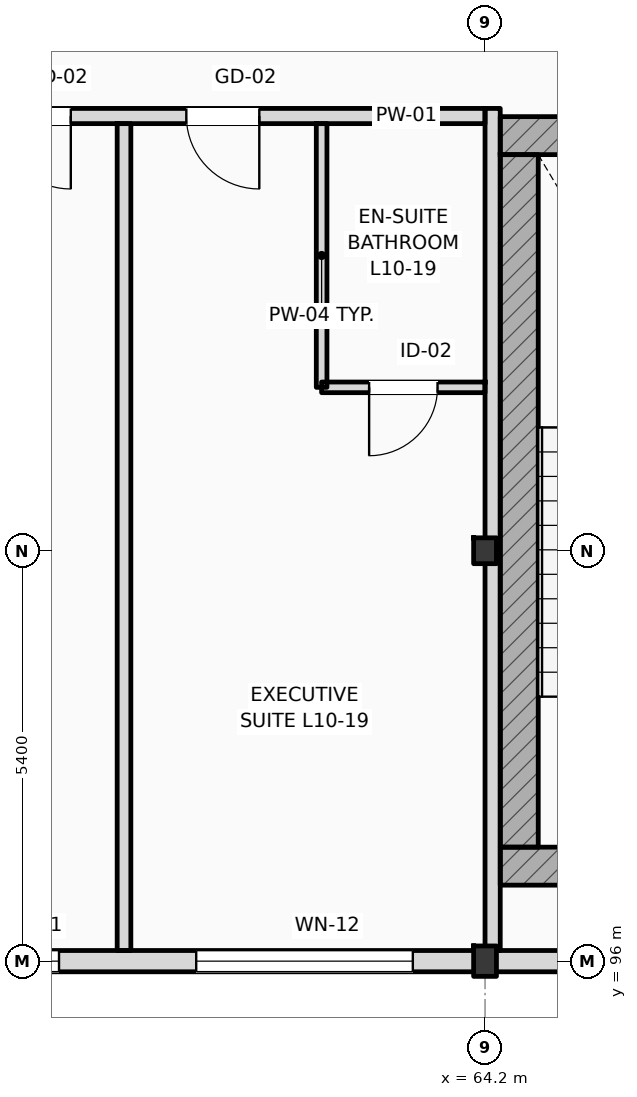
"""IFC4 building model, lengths in metres.
Left out: names, types, materials, properties, quantities, classifications, styles, units other than length and angle.
Written with IfcOpenShell. Run it as: python <this file> out.ifc"""

import sys

from ifc_helpers import new_model, si_unit, direction, frame, frame_2d, origin, origin_2d, place, context, subcontext, project, spatial, rectangle, i_section, extrude, element, fill, save


model = new_model("IFC4")
c1 = context("Model", 3, precision=1e-05, world=origin(), true_north=direction((0.0, 1.0)))
c2 = subcontext(c1, "Body", "Model", "MODEL_VIEW")
j1 = project(units=[si_unit("LENGTHUNIT", "METRE"), si_unit("PLANEANGLEUNIT", "RADIAN")], contexts=[c1])
p1 = place(None, origin())
s1 = spatial("IfcSite", under=j1, at=p1, CompositionType="ELEMENT")
p2 = place(p1, origin())
s2 = spatial("IfcBuilding", under=s1, at=p2, CompositionType="ELEMENT")
p3 = place(p2, frame((0.0, 0.0, 42.6)))
s3 = spatial("IfcBuildingStorey", under=s2, at=p3, CompositionType="ELEMENT", Elevation=42.6)
p4 = place(p3, frame((64.2, 96.0, 0.0), z_axis=(0.0, 0.0, 1.0), x_axis=(1.0, 0.0, 0.0)))
e1 = element("IfcColumn", 1, at=p4, inside=s3, PredefinedType="COLUMN", context=c2, shape_type="SweptSolid", body=[
    extrude(i_section(OverallWidth=0.3, OverallDepth=0.4, WebThickness=0.013, FlangeThickness=0.024, FilletRadius=0.027, at=origin_2d()), origin(), (0.0, 0.0, 1.0), 4.2),
])
p5 = place(p3, frame((64.2, 101.4, 0.0), z_axis=(0.0, 0.0, 1.0), x_axis=(1.0, 0.0, 0.0)))
e2 = element("IfcColumn", 2, at=p5, inside=s3, PredefinedType="COLUMN", context=c2, shape_type="SweptSolid", body=[
    extrude(i_section(OverallWidth=0.3, OverallDepth=0.34, WebThickness=0.012, FlangeThickness=0.021, FilletRadius=0.027, at=origin_2d()), origin(), (0.0, 0.0, 1.0), 4.2),
])
for number, where, z_axis, x_axis in (
    (3, (64.4, 106.862, 0.0), (0.0, 0.0, 1.0), (1.0, 0.0, 0.0)),
    (4, (64.4, 97.25, 0.0), (0.0, 0.0, 1.0), (1.0, 0.0, 0.0)),
):
    element("IfcWall", number, at=place(p3, frame(where, z_axis=z_axis, x_axis=x_axis)), inside=s3, PredefinedType="SHEAR", context=c2, shape_type="SweptSolid", body=[
        extrude(rectangle(XDim=5.16, YDim=0.5, at=frame_2d((2.58, 0.0))), origin(), (0.0, 0.0, 1.0), 4.2),
    ])
p6 = place(p3, frame((64.65, 97.5, 0.0), z_axis=(0.0, 0.0, 1.0), x_axis=(0.0, 1.0, 0.0)))
e5 = element("IfcWall", 5, at=p6, inside=s3, PredefinedType="SHEAR", context=c2, shape_type="SweptSolid", body=[
    extrude(rectangle(XDim=9.112, YDim=0.5, at=frame_2d((4.556, 0.0))), origin(), (0.0, 0.0, 1.0), 4.2),
])
p7 = place(p3, frame((25.2, 96.0, 0.0), z_axis=(0.0, 0.0, 1.0), x_axis=(1.0, 0.0, 0.0)))
e6 = element("IfcWall", 6, at=p7, inside=s3, PredefinedType="STANDARD", context=c2, shape_type="SweptSolid", body=[
    extrude(rectangle(XDim=70.2, YDim=0.28, at=frame_2d((35.1, 0.0))), origin(), (0.0, 0.0, 1.0), 3.42),
])
p8 = place(p7, frame((16.83, 0.0, 0.9)))
e7 = element("IfcOpeningElement", 7, at=p8, cuts=e6, PredefinedType="OPENING", context=c2, shape_type="SweptSolid", body=[
    extrude(rectangle(XDim=2.25, YDim=2.15, at=frame_2d((1.125, 1.075))), frame((0.0, 0.15, 0.0), z_axis=(0.0, -1.0, 0.0), x_axis=(1.0, 0.0, 0.0)), (0.0, 0.0, 1.0), 0.3),
])
p9 = place(p7, frame((20.815, 0.0, 0.9)))
e8 = element("IfcOpeningElement", 8, at=p9, cuts=e6, PredefinedType="OPENING", context=c2, shape_type="SweptSolid", body=[
    extrude(rectangle(XDim=1.8, YDim=2.2, at=frame_2d((0.9, 1.1))), frame((0.0, 0.15, 0.0), z_axis=(0.0, -1.0, 0.0), x_axis=(1.0, 0.0, 0.0)), (0.0, 0.0, 1.0), 0.3),
])
p10 = place(p7, frame((26.03, 0.0, 0.9)))
e9 = element("IfcOpeningElement", 9, at=p10, cuts=e6, PredefinedType="OPENING", context=c2, shape_type="SweptSolid", body=[
    extrude(rectangle(XDim=2.55, YDim=2.25, at=frame_2d((1.275, 1.125))), frame((0.0, 0.15, 0.0), z_axis=(0.0, -1.0, 0.0), x_axis=(1.0, 0.0, 0.0)), (0.0, 0.0, 1.0), 0.3),
])
p11 = place(p7, frame((32.045, 0.0, 0.9)))
e10 = element("IfcOpeningElement", 10, at=p11, cuts=e6, PredefinedType="OPENING", context=c2, shape_type="SweptSolid", body=[
    extrude(rectangle(XDim=1.35, YDim=2.3, at=frame_2d((0.675, 1.15))), frame((0.0, 0.15, 0.0), z_axis=(0.0, -1.0, 0.0), x_axis=(1.0, 0.0, 0.0)), (0.0, 0.0, 1.0), 0.3),
])
p12 = place(p7, frame((35.2, 0.0, 0.9)))
e11 = element("IfcOpeningElement", 11, at=p12, cuts=e6, PredefinedType="OPENING", context=c2, shape_type="SweptSolid", body=[
    extrude(rectangle(XDim=2.85, YDim=2.34, at=frame_2d((1.425, 1.17))), frame((0.0, 0.15, 0.0), z_axis=(0.0, -1.0, 0.0), x_axis=(1.0, 0.0, 0.0)), (0.0, 0.0, 1.0), 0.3),
])
p13 = place(p7, frame((55.544, 0.0, 0.9)))
e12 = element("IfcOpeningElement", 12, at=p13, cuts=e6, PredefinedType="OPENING", context=c2, shape_type="SweptSolid", body=[
    extrude(rectangle(XDim=3.0, YDim=2.34, at=frame_2d((1.5, 1.17))), frame((0.0, 0.15, 0.0), z_axis=(0.0, -1.0, 0.0), x_axis=(1.0, 0.0, 0.0)), (0.0, 0.0, 1.0), 0.3),
])
p14 = place(p7, frame((60.151, 0.0, 0.9)))
e13 = element("IfcOpeningElement", 13, at=p14, cuts=e6, PredefinedType="OPENING", context=c2, shape_type="SweptSolid", body=[
    extrude(rectangle(XDim=1.35, YDim=2.34, at=frame_2d((0.675, 1.17))), frame((0.0, 0.15, 0.0), z_axis=(0.0, -1.0, 0.0), x_axis=(1.0, 0.0, 0.0)), (0.0, 0.0, 1.0), 0.3),
])
p15 = place(p7, frame((65.582, 0.0, 0.9)))
e14 = element("IfcOpeningElement", 14, at=p15, cuts=e6, PredefinedType="OPENING", context=c2, shape_type="SweptSolid", body=[
    extrude(rectangle(XDim=3.4, YDim=2.34, at=frame_2d((1.7, 1.17))), frame((0.0, 0.15, 0.0), z_axis=(0.0, -1.0, 0.0), x_axis=(1.0, 0.0, 0.0)), (0.0, 0.0, 1.0), 0.3),
])
p16 = place(p3, frame((40.76, 107.12, 0.0), z_axis=(0.0, 0.0, 1.0), x_axis=(1.0, 0.0, 0.0)))
e15 = element("IfcWall", 15, at=p16, inside=s3, PredefinedType="PARTITIONING", context=c2, shape_type="SweptSolid", body=[
    extrude(rectangle(XDim=23.44, YDim=0.2, at=frame_2d((11.72, 0.0))), origin(), (0.0, 0.0, 1.0), 3.94),
])
p17 = place(p16, frame((2.99, 0.0, 0.0)))
e16 = element("IfcOpeningElement", 16, at=p17, cuts=e15, PredefinedType="OPENING", context=c2, shape_type="SweptSolid", body=[
    extrude(rectangle(XDim=0.96, YDim=2.2, at=frame_2d((0.48, 1.1))), frame((0.0, 0.11, 0.0), z_axis=(0.0, -1.0, 0.0), x_axis=(1.0, 0.0, 0.0)), (0.0, 0.0, 1.0), 0.22),
])
p18 = place(p16, frame((5.5, 0.0, 0.0)))
e17 = element("IfcOpeningElement", 17, at=p18, cuts=e15, PredefinedType="OPENING", context=c2, shape_type="SweptSolid", body=[
    extrude(rectangle(XDim=0.96, YDim=2.2, at=frame_2d((0.48, 1.1))), frame((0.0, 0.11, 0.0), z_axis=(0.0, -1.0, 0.0), x_axis=(1.0, 0.0, 0.0)), (0.0, 0.0, 1.0), 0.22),
])
p19 = place(p16, frame((12.34, 0.0, 0.0)))
e18 = element("IfcOpeningElement", 18, at=p19, cuts=e15, PredefinedType="OPENING", context=c2, shape_type="SweptSolid", body=[
    extrude(rectangle(XDim=0.96, YDim=2.2, at=frame_2d((0.48, 1.1))), frame((0.0, 0.11, 0.0), z_axis=(0.0, -1.0, 0.0), x_axis=(1.0, 0.0, 0.0)), (0.0, 0.0, 1.0), 0.22),
])
p20 = place(p16, frame((17.03, 0.0, 0.0)))
e19 = element("IfcOpeningElement", 19, at=p20, cuts=e15, PredefinedType="OPENING", context=c2, shape_type="SweptSolid", body=[
    extrude(rectangle(XDim=0.96, YDim=2.2, at=frame_2d((0.48, 1.1))), frame((0.0, 0.11, 0.0), z_axis=(0.0, -1.0, 0.0), x_axis=(1.0, 0.0, 0.0)), (0.0, 0.0, 1.0), 0.22),
])
p21 = place(p16, frame((19.51, 0.0, 0.0)))
e20 = element("IfcOpeningElement", 20, at=p21, cuts=e15, PredefinedType="OPENING", context=c2, shape_type="SweptSolid", body=[
    extrude(rectangle(XDim=0.96, YDim=2.2, at=frame_2d((0.48, 1.1))), frame((0.0, 0.11, 0.0), z_axis=(0.0, -1.0, 0.0), x_axis=(1.0, 0.0, 0.0)), (0.0, 0.0, 1.0), 0.22),
])
p22 = place(p3, frame((64.3, 96.14, 0.0), z_axis=(0.0, 0.0, 1.0), x_axis=(0.0, 1.0, 0.0)))
e21 = element("IfcWall", 21, at=p22, inside=s3, PredefinedType="PARTITIONING", context=c2, shape_type="SweptSolid", body=[
    extrude(rectangle(XDim=11.08, YDim=0.2, at=frame_2d((5.54, 0.0))), origin(), (0.0, 0.0, 1.0), 3.57),
])
p23 = place(p3, frame((59.45, 96.14, 0.0), z_axis=(0.0, 0.0, 1.0), x_axis=(0.0, 1.0, 0.0)))
e22 = element("IfcWall", 22, at=p23, inside=s3, PredefinedType="PARTITIONING", context=c2, shape_type="SweptSolid", body=[
    extrude(rectangle(XDim=10.88, YDim=0.18, at=frame_2d((5.44, 0.0))), origin(), (0.0, 0.0, 1.0), 3.94),
])
p24 = place(p3, frame((62.05, 103.55, 0.0), z_axis=(0.0, 0.0, 1.0), x_axis=(0.0, 1.0, 0.0)))
e23 = element("IfcWall", 23, at=p24, inside=s3, PredefinedType="PARTITIONING", context=c2, shape_type="SweptSolid", body=[
    extrude(rectangle(XDim=3.47, YDim=0.14, at=frame_2d((1.735, 0.0))), origin(), (0.0, 0.0, 1.0), 3.94),
])
p25 = place(p3, frame((62.05, 103.55, 0.0), z_axis=(0.0, 0.0, 1.0), x_axis=(1.0, 0.0, 0.0)))
e24 = element("IfcWall", 24, at=p25, inside=s3, PredefinedType="PARTITIONING", context=c2, shape_type="SweptSolid", body=[
    extrude(rectangle(XDim=2.15, YDim=0.14, at=frame_2d((1.075, 0.0))), origin(), (0.0, 0.0, 1.0), 3.94),
])
p26 = place(p25, frame((0.625, 0.0, 0.0)))
e25 = element("IfcOpeningElement", 25, at=p26, cuts=e24, PredefinedType="OPENING", context=c2, shape_type="SweptSolid", body=[
    extrude(rectangle(XDim=0.9, YDim=2.1, at=frame_2d((0.45, 1.05))), frame((0.0, 0.08, 0.0), z_axis=(0.0, -1.0, 0.0), x_axis=(1.0, 0.0, 0.0)), (0.0, 0.0, 1.0), 0.16),
])
p27 = place(p11, origin())
e26 = element("IfcWindow", 26, at=p27, inside=s3, PartitioningType="DOUBLE_PANEL_VERTICAL", PredefinedType="WINDOW", context=c2, shape_type="SweptSolid", body=[
    extrude(rectangle(XDim=1.35, YDim=2.3, at=frame_2d((0.675, 1.15))), frame((0.0, 0.03, 0.0), z_axis=(0.0, -1.0, 0.0), x_axis=(1.0, 0.0, 0.0)), (0.0, 0.0, 1.0), 0.06),
])
fill(e10, e26)
p28 = place(p12, origin())
e27 = element("IfcWindow", 27, at=p28, inside=s3, PartitioningType="DOUBLE_PANEL_VERTICAL", PredefinedType="WINDOW", context=c2, shape_type="SweptSolid", body=[
    extrude(rectangle(XDim=2.85, YDim=2.34, at=frame_2d((1.425, 1.17))), frame((0.0, 0.03, 0.0), z_axis=(0.0, -1.0, 0.0), x_axis=(1.0, 0.0, 0.0)), (0.0, 0.0, 1.0), 0.06),
])
fill(e11, e27)
p29 = place(p20, frame((0.96, 0.0, 0.0), z_axis=(0.0, 0.0, 1.0), x_axis=(-1.0, 0.0, 0.0)))
e28 = element("IfcDoor", 28, at=p29, inside=s3, OperationType="SINGLE_SWING_RIGHT", PredefinedType="DOOR", context=c2, shape_type="SweptSolid", body=[
    extrude(rectangle(XDim=0.96, YDim=2.2, at=frame_2d((0.48, 1.1))), frame((0.0, 0.025, 0.0), z_axis=(0.0, -1.0, 0.0), x_axis=(1.0, 0.0, 0.0)), (0.0, 0.0, 1.0), 0.05),
])
fill(e19, e28)
p30 = place(p21, frame((0.96, 0.0, 0.0), z_axis=(0.0, 0.0, 1.0), x_axis=(-1.0, 0.0, 0.0)))
e29 = element("IfcDoor", 29, at=p30, inside=s3, OperationType="SINGLE_SWING_RIGHT", PredefinedType="DOOR", context=c2, shape_type="SweptSolid", body=[
    extrude(rectangle(XDim=0.96, YDim=2.2, at=frame_2d((0.48, 1.1))), frame((0.0, 0.025, 0.0), z_axis=(0.0, -1.0, 0.0), x_axis=(1.0, 0.0, 0.0)), (0.0, 0.0, 1.0), 0.05),
])
fill(e20, e29)
p31 = place(p26, frame((0.9, 0.0, 0.0), z_axis=(0.0, 0.0, 1.0), x_axis=(-1.0, 0.0, 0.0)))
e30 = element("IfcDoor", 30, at=p31, inside=s3, OperationType="SINGLE_SWING_LEFT", PredefinedType="DOOR", context=c2, shape_type="SweptSolid", body=[
    extrude(rectangle(XDim=0.9, YDim=2.1, at=frame_2d((0.45, 1.05))), frame((0.0, 0.025, 0.0), z_axis=(0.0, -1.0, 0.0), x_axis=(1.0, 0.0, 0.0)), (0.0, 0.0, 1.0), 0.05),
])
fill(e25, e30)
save(model, sys.argv[1])
